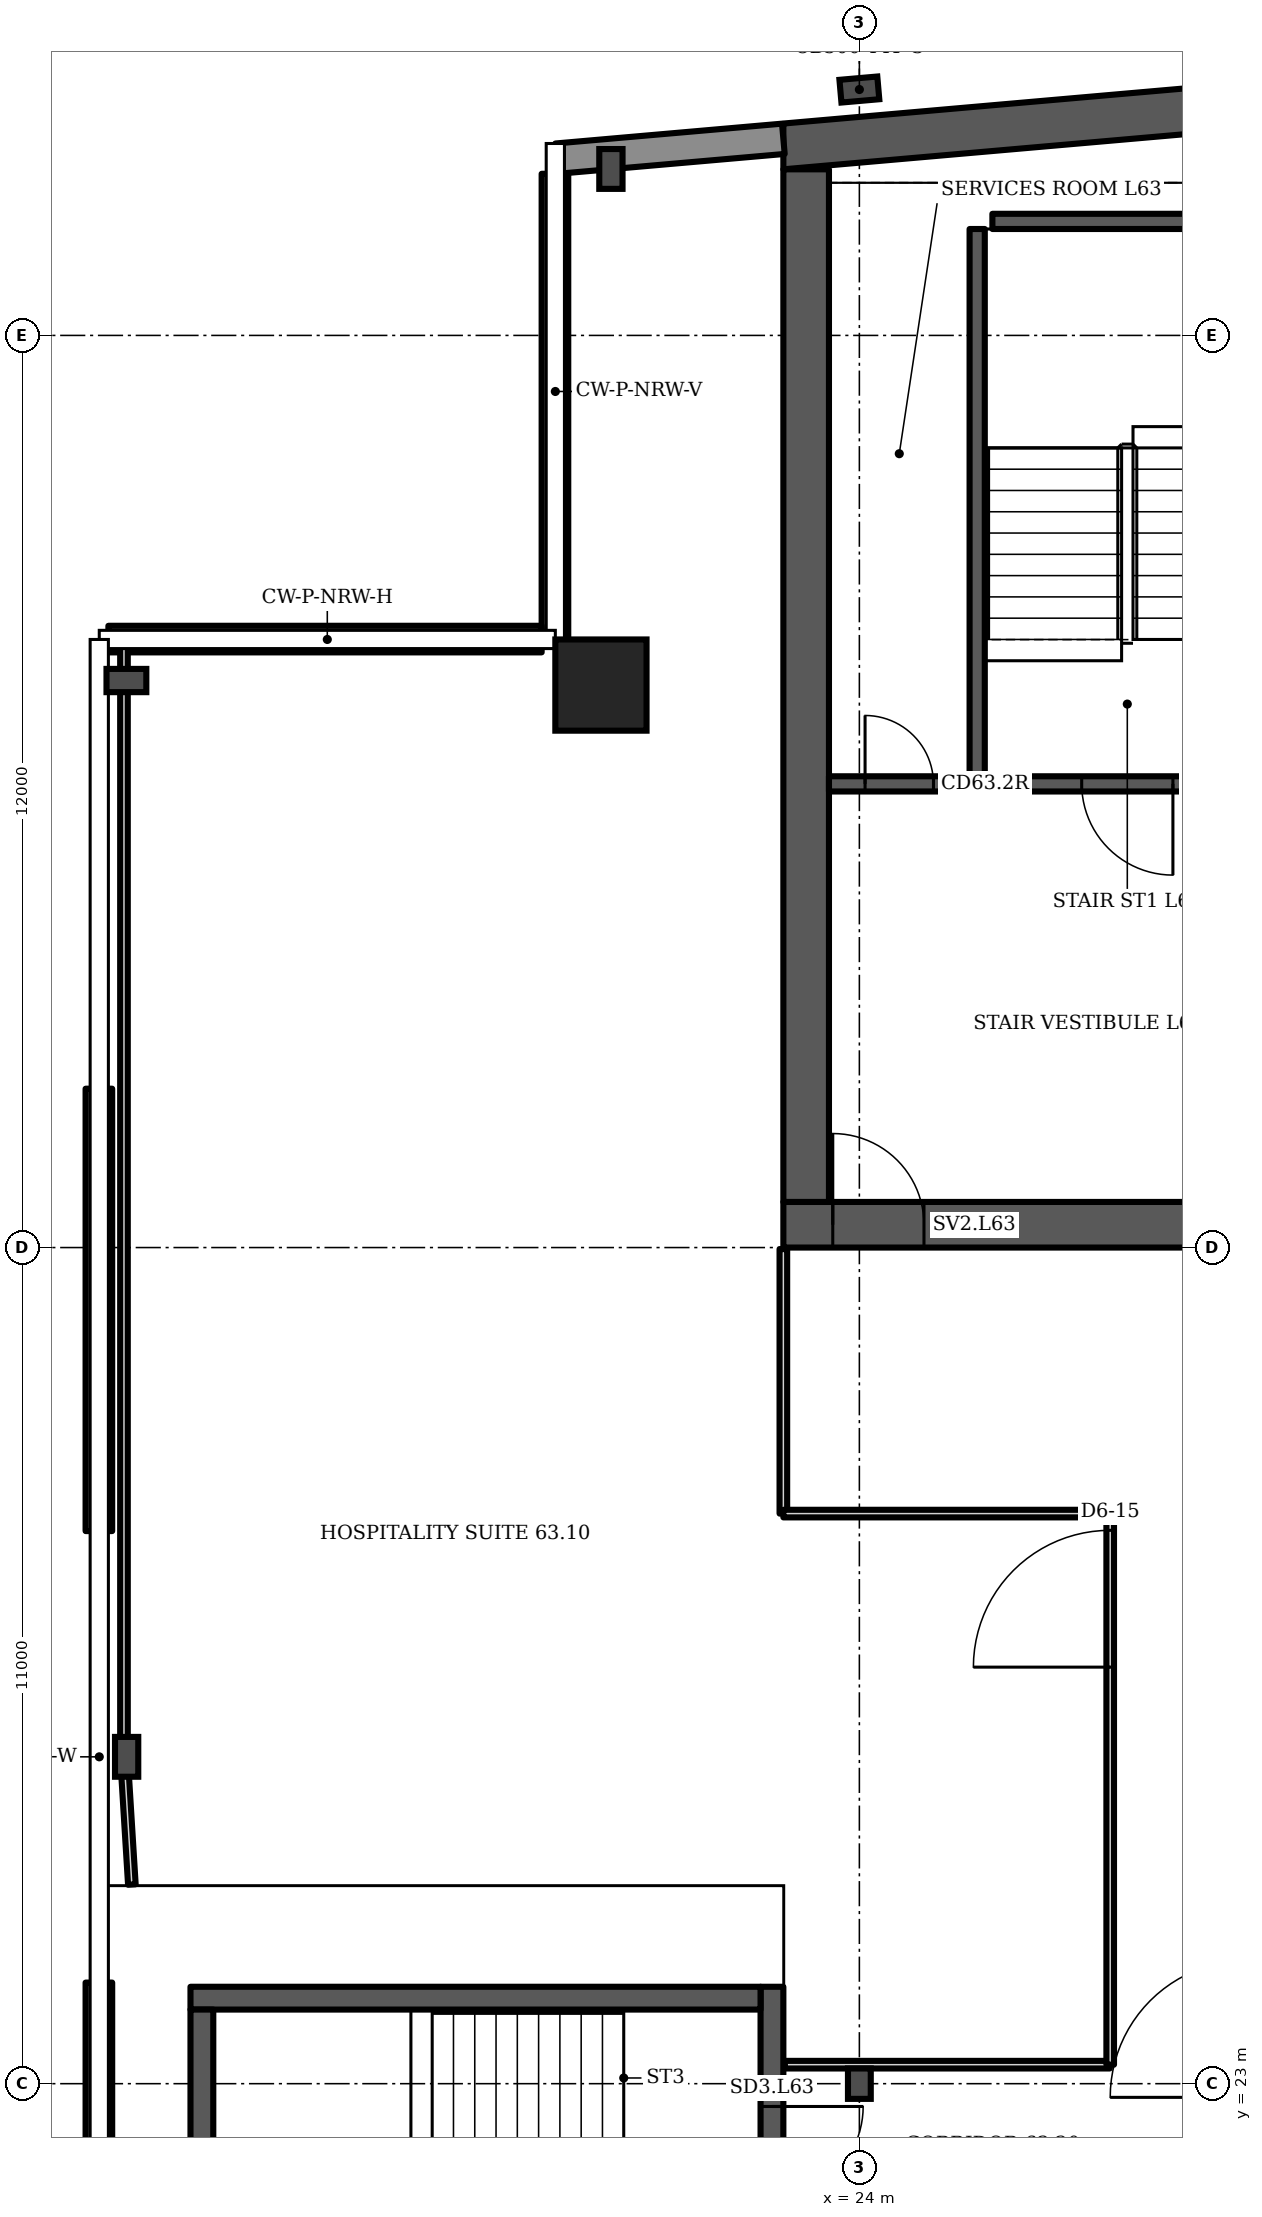
"""IFC4 building model, lengths in metres.
Left out: names, types, materials, properties, quantities, classifications, styles, units other than length and angle.
Written with IfcOpenShell. Run it as: python <this file> out.ifc"""

import sys

from ifc_helpers import new_model, si_unit, direction, frame, frame_2d, origin, origin_2d, place, context, subcontext, project, spatial, polyline, rectangle, i_section, outline, extrude, element, fill, save


model = new_model("IFC4")
c1 = context("Model", 3, precision=1e-05, world=origin(), true_north=direction((0.0, 1.0)))
c2 = subcontext(c1, "Body", "Model", "MODEL_VIEW")
j1 = project(units=[si_unit("LENGTHUNIT", "METRE"), si_unit("PLANEANGLEUNIT", "RADIAN")], contexts=[c1])
p1 = place(None, origin())
s1 = spatial("IfcSite", under=j1, at=p1, CompositionType="ELEMENT")
p2 = place(p1, origin())
s2 = spatial("IfcBuilding", under=s1, at=p2, CompositionType="ELEMENT")
p3 = place(p2, frame((0.0, 0.0, 250.3)))
s3 = spatial("IfcBuildingStorey", under=s2, at=p3, CompositionType="ELEMENT", Elevation=250.3)
p4 = place(p3, frame((0.0, 0.0, -0.0)))
e1 = element("IfcWall", 1, at=p4, inside=s3, PredefinedType="SHEAR", context=c2, shape_type="SweptSolid", body=[
    extrude(outline(polyline([(23.0, 48.185), (40.5, 49.716), (58.0, 48.185), (58.0, 48.787), (40.5, 50.318), (23.0, 48.787), (23.0, 48.185)])), origin(), (0.0, 0.0, 1.0), 3.6),
])
p5 = place(p3, frame((23.0, 34.3, 0.0), z_axis=(0.0, 0.0, 1.0), x_axis=(1.0, 0.0, 0.0)))
e2 = element("IfcWall", 2, at=p5, inside=s3, PredefinedType="SHEAR", context=c2, shape_type="SweptSolid", body=[
    extrude(rectangle(XDim=35.0, YDim=0.6, at=frame_2d((17.5, 0.0))), origin(), (0.0, 0.0, 1.0), 3.6),
])
p6 = place(p5, frame((0.65, 0.0, 0.0)))
e3 = element("IfcOpeningElement", 3, at=p6, cuts=e2, PredefinedType="OPENING", context=c2, shape_type="SweptSolid", body=[
    extrude(rectangle(XDim=1.2, YDim=2.1, at=frame_2d((0.6, 1.05))), frame((0.0, 0.31, 0.0), z_axis=(0.0, -1.0, 0.0), x_axis=(1.0, 0.0, 0.0)), (0.0, 0.0, 1.0), 0.62),
])
p7 = place(p5, frame((7.717, 0.0, 0.0)))
e4 = element("IfcOpeningElement", 4, at=p7, cuts=e2, PredefinedType="OPENING", context=c2, shape_type="SweptSolid", body=[
    extrude(rectangle(XDim=1.1, YDim=2.1, at=frame_2d((0.55, 1.05))), frame((0.0, 0.31, 0.0), z_axis=(0.0, -1.0, 0.0), x_axis=(1.0, 0.0, 0.0)), (0.0, 0.0, 1.0), 0.62),
])
p8 = place(p5, frame((12.183, 0.0, 0.0)))
e5 = element("IfcOpeningElement", 5, at=p8, cuts=e2, PredefinedType="OPENING", context=c2, shape_type="SweptSolid", body=[
    extrude(rectangle(XDim=1.1, YDim=2.1, at=frame_2d((0.55, 1.05))), frame((0.0, 0.31, 0.0), z_axis=(0.0, -1.0, 0.0), x_axis=(1.0, 0.0, 0.0)), (0.0, 0.0, 1.0), 0.62),
])
p9 = place(p5, frame((9.8, 0.0, 0.0)))
e6 = element("IfcOpeningElement", 6, at=p9, cuts=e2, PredefinedType="OPENING", context=c2, shape_type="SweptSolid", body=[
    extrude(rectangle(XDim=1.4, YDim=2.1, at=frame_2d((0.7, 1.05))), frame((0.0, 0.31, 0.0), z_axis=(0.0, -1.0, 0.0), x_axis=(1.0, 0.0, 0.0)), (0.0, 0.0, 1.0), 0.62),
])
p10 = place(p5, frame((14.717, 0.0, 0.0)))
e7 = element("IfcOpeningElement", 7, at=p10, cuts=e2, PredefinedType="OPENING", context=c2, shape_type="SweptSolid", body=[
    extrude(rectangle(XDim=1.1, YDim=2.1, at=frame_2d((0.55, 1.05))), frame((0.0, 0.31, 0.0), z_axis=(0.0, -1.0, 0.0), x_axis=(1.0, 0.0, 0.0)), (0.0, 0.0, 1.0), 0.62),
])
p11 = place(p5, frame((16.95, 0.0, 0.0)))
e8 = element("IfcOpeningElement", 8, at=p11, cuts=e2, PredefinedType="OPENING", context=c2, shape_type="SweptSolid", body=[
    extrude(rectangle(XDim=1.1, YDim=2.1, at=frame_2d((0.55, 1.05))), frame((0.0, 0.31, 0.0), z_axis=(0.0, -1.0, 0.0), x_axis=(1.0, 0.0, 0.0)), (0.0, 0.0, 1.0), 0.62),
])
p12 = place(p5, frame((19.183, 0.0, 0.0)))
e9 = element("IfcOpeningElement", 9, at=p12, cuts=e2, PredefinedType="OPENING", context=c2, shape_type="SweptSolid", body=[
    extrude(rectangle(XDim=1.1, YDim=2.1, at=frame_2d((0.55, 1.05))), frame((0.0, 0.31, 0.0), z_axis=(0.0, -1.0, 0.0), x_axis=(1.0, 0.0, 0.0)), (0.0, 0.0, 1.0), 0.62),
])
p13 = place(p5, frame((26.15, 0.0, 0.0)))
e10 = element("IfcOpeningElement", 10, at=p13, cuts=e2, PredefinedType="OPENING", context=c2, shape_type="SweptSolid", body=[
    extrude(rectangle(XDim=1.2, YDim=2.1, at=frame_2d((0.6, 1.05))), frame((0.0, 0.31, 0.0), z_axis=(0.0, -1.0, 0.0), x_axis=(1.0, 0.0, 0.0)), (0.0, 0.0, 1.0), 0.62),
])
p14 = place(p5, frame((28.767, 0.0, 0.0)))
e11 = element("IfcOpeningElement", 11, at=p14, cuts=e2, PredefinedType="OPENING", context=c2, shape_type="SweptSolid", body=[
    extrude(rectangle(XDim=1.0, YDim=2.1, at=frame_2d((0.5, 1.05))), frame((0.0, 0.31, 0.0), z_axis=(0.0, -1.0, 0.0), x_axis=(1.0, 0.0, 0.0)), (0.0, 0.0, 1.0), 0.62),
])
p15 = place(p5, frame((33.083, 0.0, 0.0)))
e12 = element("IfcOpeningElement", 12, at=p15, cuts=e2, PredefinedType="OPENING", context=c2, shape_type="SweptSolid", body=[
    extrude(rectangle(XDim=1.0, YDim=2.1, at=frame_2d((0.5, 1.05))), frame((0.0, 0.31, 0.0), z_axis=(0.0, -1.0, 0.0), x_axis=(1.0, 0.0, 0.0)), (0.0, 0.0, 1.0), 0.62),
])
p16 = place(p5, frame((30.8, 0.0, 0.0)))
e13 = element("IfcOpeningElement", 13, at=p16, cuts=e2, PredefinedType="OPENING", context=c2, shape_type="SweptSolid", body=[
    extrude(rectangle(XDim=1.4, YDim=2.1, at=frame_2d((0.7, 1.05))), frame((0.0, 0.31, 0.0), z_axis=(0.0, -1.0, 0.0), x_axis=(1.0, 0.0, 0.0)), (0.0, 0.0, 1.0), 0.62),
])
p17 = place(p3, frame((23.3, 34.6, 0.0), z_axis=(0.0, 0.0, 1.0), x_axis=(0.0, 1.0, 0.0)))
e14 = element("IfcWall", 14, at=p17, inside=s3, PredefinedType="SHEAR", context=c2, shape_type="SweptSolid", body=[
    extrude(rectangle(XDim=13.585, YDim=0.6, at=frame_2d((6.792, 0.0))), origin(), (0.0, 0.0, 1.0), 3.6),
])
p18 = place(p3, frame((20.6, 41.4, 0.0), z_axis=(0.0, 0.0, 1.0), x_axis=(1.0, 0.0, 0.0)))
e15 = element("IfcColumn", 15, at=p18, inside=s3, PredefinedType="COLUMN", context=c2, shape_type="SweptSolid", body=[
    extrude(rectangle(XDim=1.2, YDim=1.2, at=origin_2d()), origin(), (0.0, 0.0, 1.0), 3.6),
])
for number, where, z_axis, x_axis in (
    (16, (20.731, 48.19, 0.0), (0.0, 0.0, 1.0), (-1.0, 0.0, 0.0)),
    (17, (14.357, 41.46, 0.0), (0.0, 0.0, 1.0), (0.0, 1.0, 0.0)),
    (18, (14.36, 27.3, 0.0), (0.0, 0.0, 1.0), (-1.0, 0.0, 0.0)),
):
    element("IfcColumn", number, at=place(p3, frame(where, z_axis=z_axis, x_axis=x_axis)), inside=s3, PredefinedType="COLUMN", context=c2, shape_type="SweptSolid", body=[
        extrude(i_section(OverallWidth=0.306, OverallDepth=0.524, WebThickness=0.021, FlangeThickness=0.04, FilletRadius=0.027, at=origin_2d()), origin(), (0.0, 0.0, 1.0), 3.6),
    ])
p19 = place(p3, frame((24.0, 23.0, 0.0), z_axis=(0.0, 0.0, 1.0), x_axis=(1.0, 0.0, 0.0)))
e19 = element("IfcColumn", 19, at=p19, inside=s3, PredefinedType="COLUMN", context=c2, shape_type="SweptSolid", body=[
    extrude(i_section(OverallWidth=0.3, OverallDepth=0.4, WebThickness=0.013, FlangeThickness=0.024, FilletRadius=0.027, at=origin_2d()), origin(), (0.0, 0.0, 1.0), 3.6),
])
p20 = place(p3, frame((24.0, 49.235, 0.0), z_axis=(0.0, 0.0, 1.0), x_axis=(-0.087156, 0.996197, 0.0)))
e20 = element("IfcColumn", 20, at=p20, inside=s3, PredefinedType="COLUMN", context=c2, shape_type="SweptSolid", body=[
    extrude(i_section(OverallWidth=0.3, OverallDepth=0.5, WebThickness=0.014, FlangeThickness=0.028, FilletRadius=0.027, at=origin_2d()), origin(), (0.0, 0.0, 1.0), 3.6),
])
p21 = place(p3, frame((23.0, 48.587, 0.0), z_axis=(0.0, 0.0, 1.0), x_axis=(-0.996194, -0.087168, 0.0)))
e21 = element("IfcWall", 21, at=p21, inside=s3, PredefinedType="SOLIDWALL", context=c2, shape_type="SweptSolid", body=[
    extrude(rectangle(XDim=2.994, YDim=0.4, at=frame_2d((1.497, 0.0))), origin(), (0.0, 0.0, 1.0), 3.2),
])
p22 = place(p3, frame((19.995, 48.126, 0.0), z_axis=(0.0, 0.0, 1.0), x_axis=(0.0, -1.0, 0.0)))
e22 = element("IfcWall", 22, at=p22, inside=s3, PredefinedType="SOLIDWALL", context=c2, shape_type="SweptSolid", body=[
    extrude(rectangle(XDim=6.126, YDim=0.35, at=frame_2d((3.063, 0.0))), origin(), (0.0, 0.0, 1.0), 1.0),
])
p23 = place(p3, frame((19.82, 42.005, 0.0), z_axis=(0.0, 0.0, 1.0), x_axis=(-1.0, 0.0, 0.0)))
e23 = element("IfcWall", 23, at=p23, inside=s3, PredefinedType="SOLIDWALL", context=c2, shape_type="SweptSolid", body=[
    extrude(rectangle(XDim=5.7, YDim=0.35, at=frame_2d((2.85, 0.0))), origin(), (0.0, 0.0, 1.0), 1.0),
])
for number, where, z_axis, x_axis in (
    (24, (13.995, 36.09, 0.0), (0.0, 0.0, 1.0), (0.0, -1.0, 0.0)),
    (25, (13.995, 24.33, 0.0), (0.0, 0.0, 1.0), (0.0, -1.0, 0.0)),
):
    element("IfcWall", number, at=place(p3, frame(where, z_axis=z_axis, x_axis=x_axis)), inside=s3, PredefinedType="SOLIDWALL", context=c2, shape_type="SweptSolid", body=[
        extrude(rectangle(XDim=5.82, YDim=0.35, at=frame_2d((2.91, 0.0))), origin(), (0.0, 0.0, 1.0), 1.0),
    ])
p24 = place(p3, frame((23.6, 40.1, 0.0), z_axis=(0.0, 0.0, 1.0), x_axis=(1.0, 0.0, 0.0)))
e26 = element("IfcWall", 26, at=p24, inside=s3, PredefinedType="SHEAR", context=c2, shape_type="SweptSolid", body=[
    extrude(rectangle(XDim=6.1, YDim=0.2, at=frame_2d((3.05, 0.0))), origin(), (0.0, 0.0, 1.0), 3.2),
])
p25 = place(p24, frame((3.325, 0.0, 0.0)))
e27 = element("IfcOpeningElement", 27, at=p25, cuts=e26, PredefinedType="OPENING", context=c2, shape_type="SweptSolid", body=[
    extrude(rectangle(XDim=1.2, YDim=2.1, at=frame_2d((0.6, 1.05))), frame((0.0, 0.11, 0.0), z_axis=(0.0, -1.0, 0.0), x_axis=(1.0, 0.0, 0.0)), (0.0, 0.0, 1.0), 0.22),
])
p26 = place(p24, frame((0.475, 0.0, 0.0)))
e28 = element("IfcOpeningElement", 28, at=p26, cuts=e26, PredefinedType="OPENING", context=c2, shape_type="SweptSolid", body=[
    extrude(rectangle(XDim=0.9, YDim=2.1, at=frame_2d((0.45, 1.05))), frame((0.0, 0.11, 0.0), z_axis=(0.0, -1.0, 0.0), x_axis=(1.0, 0.0, 0.0)), (0.0, 0.0, 1.0), 0.22),
])
p27 = place(p3, frame((25.55, 40.2, 0.0), z_axis=(0.0, 0.0, 1.0), x_axis=(0.0, 1.0, 0.0)))
e29 = element("IfcWall", 29, at=p27, inside=s3, PredefinedType="SHEAR", context=c2, shape_type="SweptSolid", body=[
    extrude(rectangle(XDim=7.2, YDim=0.2, at=frame_2d((3.6, 0.0))), origin(), (0.0, 0.0, 1.0), 3.2),
])
p28 = place(p3, frame((25.75, 47.5, 0.0), z_axis=(0.0, 0.0, 1.0), x_axis=(1.0, 0.0, 0.0)))
e30 = element("IfcWall", 30, at=p28, inside=s3, PredefinedType="SHEAR", context=c2, shape_type="SweptSolid", body=[
    extrude(rectangle(XDim=3.95, YDim=0.2, at=frame_2d((1.975, 0.0))), origin(), (0.0, 0.0, 1.0), 3.2),
])
p29 = place(p3, frame((22.85, 19.925, 0.0), z_axis=(0.0, 0.0, 1.0), x_axis=(0.0, 1.0, 0.0)))
e31 = element("IfcWall", 31, at=p29, inside=s3, PredefinedType="SHEAR", context=c2, shape_type="SweptSolid", body=[
    extrude(rectangle(XDim=4.35, YDim=0.3, at=frame_2d((2.175, 0.0))), origin(), (0.0, 0.0, 1.0), 3.2),
])
p30 = place(p29, frame((1.575, 0.0, 0.0)))
e32 = element("IfcOpeningElement", 32, at=p30, cuts=e31, PredefinedType="OPENING", context=c2, shape_type="SweptSolid", body=[
    extrude(rectangle(XDim=1.2, YDim=2.1, at=frame_2d((0.6, 1.05))), frame((0.0, 0.16, 0.0), z_axis=(0.0, -1.0, 0.0), x_axis=(1.0, 0.0, 0.0)), (0.0, 0.0, 1.0), 0.32),
])
p31 = place(p3, frame((14.325, 27.3, 0.0), z_axis=(0.0, 0.0, 1.0), x_axis=(0.0, 1.0, 0.0)))
e33 = element("IfcWall", 33, at=p31, inside=s3, PredefinedType="PARTITIONING", context=c2, shape_type="SweptSolid", body=[
    extrude(rectangle(XDim=14.68, YDim=0.1, at=frame_2d((7.34, 0.0))), origin(), (0.0, 0.0, 1.0), 2.58),
])
p32 = place(p3, frame((14.429, 25.62, 0.0), z_axis=(0.0, 0.0, 1.0), x_axis=(-0.061647, 0.998101, 0.0)))
e34 = element("IfcWall", 34, at=p32, inside=s3, PredefinedType="PARTITIONING", context=c2, shape_type="SweptSolid", body=[
    extrude(rectangle(XDim=1.683, YDim=0.1, at=frame_2d((0.842, 0.0))), origin(), (0.0, 0.0, 1.0), 3.2),
])
p33 = place(p3, frame((23.0, 30.5, 0.0), z_axis=(0.0, 0.0, 1.0), x_axis=(0.0, 1.0, 0.0)))
e35 = element("IfcWall", 35, at=p33, inside=s3, PredefinedType="PARTITIONING", context=c2, shape_type="SweptSolid", body=[
    extrude(rectangle(XDim=3.48, YDim=0.1, at=frame_2d((1.74, 0.0))), origin(), (0.0, 0.0, 1.0), 3.2),
])
p34 = place(p3, frame((23.0, 30.5, 0.0), z_axis=(0.0, 0.0, 1.0), x_axis=(1.0, 0.0, 0.0)))
e36 = element("IfcWall", 36, at=p34, inside=s3, PredefinedType="PARTITIONING", context=c2, shape_type="SweptSolid", body=[
    extrude(rectangle(XDim=4.3, YDim=0.1, at=frame_2d((2.15, 0.0))), origin(), (0.0, 0.0, 1.0), 3.2),
])
p35 = place(p3, frame((23.02, 23.25, 0.0), z_axis=(0.0, 0.0, 1.0), x_axis=(1.0, 0.0, 0.0)))
e37 = element("IfcWall", 37, at=p35, inside=s3, PredefinedType="PARTITIONING", context=c2, shape_type="SweptSolid", body=[
    extrude(rectangle(XDim=4.275, YDim=0.1, at=frame_2d((2.137, 0.0))), origin(), (0.0, 0.0, 1.0), 3.2),
])
p36 = place(p3, frame((27.3, 23.25, 0.0), z_axis=(0.0, 0.0, 1.0), x_axis=(0.0, 1.0, 0.0)))
e38 = element("IfcWall", 38, at=p36, inside=s3, PredefinedType="PARTITIONING", context=c2, shape_type="SweptSolid", body=[
    extrude(rectangle(XDim=7.25, YDim=0.1, at=frame_2d((3.625, 0.0))), origin(), (0.0, 0.0, 1.0), 3.2),
])
p37 = place(p36, frame((5.23, 0.0, 0.0)))
e39 = element("IfcOpeningElement", 39, at=p37, cuts=e38, PredefinedType="OPENING", context=c2, shape_type="SweptSolid", body=[
    extrude(rectangle(XDim=1.8, YDim=2.1, at=frame_2d((0.9, 1.05))), frame((0.0, 0.06, 0.0), z_axis=(0.0, -1.0, 0.0), x_axis=(1.0, 0.0, 0.0)), (0.0, 0.0, 1.0), 0.12),
])
p38 = place(p3, frame((15.2, 24.125, 0.0), z_axis=(0.0, 0.0, 1.0), x_axis=(1.0, 0.0, 0.0)))
e40 = element("IfcWall", 40, at=p38, inside=s3, PredefinedType="SHEAR", context=c2, shape_type="SweptSolid", body=[
    extrude(rectangle(XDim=7.5, YDim=0.3, at=frame_2d((3.75, 0.0))), origin(), (0.0, 0.0, 1.0), 3.2),
])
p39 = place(p3, frame((15.35, 20.225, 0.0), z_axis=(0.0, 0.0, 1.0), x_axis=(0.0, 1.0, 0.0)))
e41 = element("IfcWall", 41, at=p39, inside=s3, PredefinedType="SHEAR", context=c2, shape_type="SweptSolid", body=[
    extrude(rectangle(XDim=3.75, YDim=0.3, at=frame_2d((1.875, 0.0))), origin(), (0.0, 0.0, 1.0), 3.2),
])
p40 = place(p25, origin())
e42 = element("IfcDoor", 42, at=p40, inside=s3, OperationType="SINGLE_SWING_RIGHT", PredefinedType="DOOR", context=c2, shape_type="SweptSolid", body=[
    extrude(rectangle(XDim=1.2, YDim=2.1, at=frame_2d((0.6, 1.05))), frame((0.0, 0.025, 0.0), z_axis=(0.0, -1.0, 0.0), x_axis=(1.0, 0.0, 0.0)), (0.0, 0.0, 1.0), 0.05),
])
fill(e27, e42)
p41 = place(p26, origin())
e43 = element("IfcDoor", 43, at=p41, inside=s3, OperationType="SINGLE_SWING_LEFT", PredefinedType="DOOR", context=c2, shape_type="SweptSolid", body=[
    extrude(rectangle(XDim=0.9, YDim=2.1, at=frame_2d((0.45, 1.05))), frame((0.0, 0.025, 0.0), z_axis=(0.0, -1.0, 0.0), x_axis=(1.0, 0.0, 0.0)), (0.0, 0.0, 1.0), 0.05),
])
fill(e28, e43)
p42 = place(p6, origin())
e44 = element("IfcDoor", 44, at=p42, inside=s3, OperationType="SINGLE_SWING_LEFT", PredefinedType="DOOR", context=c2, shape_type="SweptSolid", body=[
    extrude(rectangle(XDim=1.2, YDim=2.1, at=frame_2d((0.6, 1.05))), frame((0.0, 0.025, 0.0), z_axis=(0.0, -1.0, 0.0), x_axis=(1.0, 0.0, 0.0)), (0.0, 0.0, 1.0), 0.05),
])
fill(e3, e44)
p43 = place(p30, origin())
e45 = element("IfcDoor", 45, at=p43, inside=s3, OperationType="SINGLE_SWING_RIGHT", PredefinedType="DOOR", context=c2, shape_type="SweptSolid", body=[
    extrude(rectangle(XDim=1.2, YDim=2.1, at=frame_2d((0.6, 1.05))), frame((0.0, 0.025, 0.0), z_axis=(0.0, -1.0, 0.0), x_axis=(1.0, 0.0, 0.0)), (0.0, 0.0, 1.0), 0.05),
])
fill(e32, e45)
p44 = place(p37, origin())
e46 = element("IfcDoor", 46, at=p44, inside=s3, OperationType="DOUBLE_DOOR_SINGLE_SWING", PredefinedType="DOOR", context=c2, shape_type="SweptSolid", body=[
    extrude(rectangle(XDim=1.8, YDim=2.1, at=frame_2d((0.9, 1.05))), frame((0.0, 0.025, 0.0), z_axis=(0.0, -1.0, 0.0), x_axis=(1.0, 0.0, 0.0)), (0.0, 0.0, 1.0), 0.05),
])
fill(e39, e46)
save(model, sys.argv[1])
